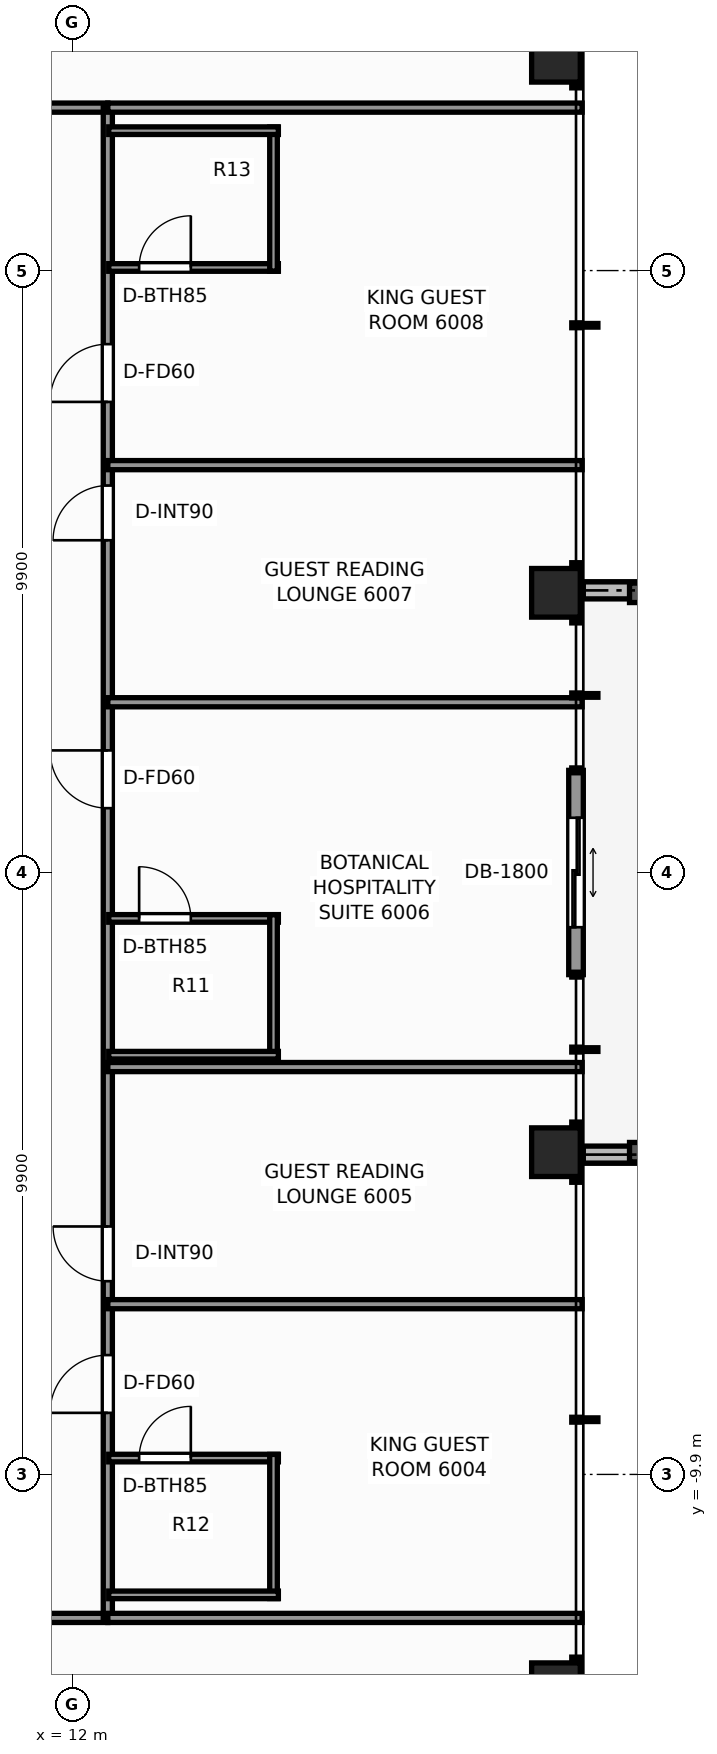
"""IFC4 building model, lengths in metres.
Left out: names, types, materials, properties, quantities, classifications, styles, units other than length and angle.
Written with IfcOpenShell. Run it as: python <this file> out.ifc"""

import sys

from ifc_helpers import new_model, si_unit, direction, frame, frame_2d, origin, origin_2d, place, context, subcontext, project, spatial, rectangle, extrude, element, fill, save


model = new_model("IFC4")
c1 = context("Model", 3, precision=1e-05, world=origin(), true_north=direction((0.0, 1.0)))
c2 = subcontext(c1, "Body", "Model", "MODEL_VIEW")
j1 = project(units=[si_unit("LENGTHUNIT", "METRE"), si_unit("PLANEANGLEUNIT", "RADIAN")], contexts=[c1])
p1 = place(None, origin())
s1 = spatial("IfcSite", under=j1, at=p1, CompositionType="ELEMENT")
p2 = place(p1, origin())
s2 = spatial("IfcBuilding", under=s1, at=p2, CompositionType="ELEMENT")
p3 = place(p2, frame((0.0, 0.0, 206.4)))
s3 = spatial("IfcBuildingStorey", under=s2, at=p3, CompositionType="ELEMENT", Elevation=206.4)
for number, where, z_axis, x_axis in (
    (1, (19.95, -13.4, 0.0), (0.0, 0.0, 1.0), (1.0, 0.0, 0.0)),
    (2, (19.95, -4.6, 0.0), (0.0, 0.0, 1.0), (1.0, 0.0, 0.0)),
    (3, (19.95, 4.6, 0.0), (0.0, 0.0, 1.0), (1.0, 0.0, 0.0)),
    (4, (19.95, 13.4, 0.0), (0.0, 0.0, 1.0), (1.0, 0.0, 0.0)),
):
    element("IfcColumn", number, at=place(p3, frame(where, z_axis=z_axis, x_axis=x_axis)), inside=s3, PredefinedType="COLUMN", context=c2, shape_type="SweptSolid", body=[
        extrude(rectangle(XDim=0.8, YDim=0.8, at=origin_2d()), origin(), (0.0, 0.0, 1.0), 3.3),
    ])
for number, where, z_axis, x_axis in (
    (5, (20.4, -4.64, -0.04), (0.0, 0.0, 1.0), (1.0, 0.0, 0.0)),
    (6, (23.7, 4.64, -0.04), (0.0, 0.0, 1.0), (-1.0, 0.0, 0.0)),
):
    element("IfcWall", number, at=place(p3, frame(where, z_axis=z_axis, x_axis=x_axis)), inside=s3, PredefinedType="PARAPET", context=c2, shape_type="SweptSolid", body=[
        extrude(rectangle(XDim=3.3, YDim=0.28, at=frame_2d((1.65, 0.0))), origin(), (0.0, 0.0, 1.0), 0.42),
    ])
p4 = place(p3, frame((20.28, 1.68, 0.0), z_axis=(0.0, 0.0, 1.0), x_axis=(0.0, -1.0, 0.0)))
e7 = element("IfcWall", 7, at=p4, inside=s3, PredefinedType="STANDARD", context=c2, shape_type="SweptSolid", body=[
    extrude(rectangle(XDim=3.36, YDim=0.24, at=frame_2d((1.68, 0.0))), origin(), (0.0, 0.0, 1.0), 3.08),
])
p5 = place(p4, frame((0.78, 0.0, 0.0)))
e8 = element("IfcOpeningElement", 8, at=p5, cuts=e7, PredefinedType="OPENING", context=c2, shape_type="SweptSolid", body=[
    extrude(rectangle(XDim=1.8, YDim=2.2, at=frame_2d((0.9, 1.1))), frame((0.0, 0.13, 0.0), z_axis=(0.0, -1.0, 0.0), x_axis=(1.0, 0.0, 0.0)), (0.0, 0.0, 1.0), 0.26),
])
p6 = place(p3, frame((-12.58, -12.26, 0.0), z_axis=(0.0, 0.0, 1.0), x_axis=(1.0, 0.0, 0.0)))
e9 = element("IfcWall", 9, at=p6, inside=s3, PredefinedType="PARTITIONING", context=c2, shape_type="SweptSolid", body=[
    extrude(rectangle(XDim=25.16, YDim=0.15, at=frame_2d((12.58, 0.0))), origin(), (0.0, 0.0, 1.0), 2.369),
])
p7 = place(p6, frame((3.657, 0.0, 0.0)))
e10 = element("IfcOpeningElement", 10, at=p7, cuts=e9, PredefinedType="OPENING", context=c2, shape_type="SweptSolid", body=[
    extrude(rectangle(XDim=0.9, YDim=2.06, at=frame_2d((0.45, 1.03))), frame((0.0, 0.085, 0.0), z_axis=(0.0, -1.0, 0.0), x_axis=(1.0, 0.0, 0.0)), (0.0, 0.0, 1.0), 0.17),
])
p8 = place(p6, frame((6.082, 0.0, 0.0)))
e11 = element("IfcOpeningElement", 11, at=p8, cuts=e9, PredefinedType="OPENING", context=c2, shape_type="SweptSolid", body=[
    extrude(rectangle(XDim=0.9, YDim=2.06, at=frame_2d((0.45, 1.03))), frame((0.0, 0.085, 0.0), z_axis=(0.0, -1.0, 0.0), x_axis=(1.0, 0.0, 0.0)), (0.0, 0.0, 1.0), 0.17),
])
p9 = place(p6, frame((8.836, 0.0, 0.0)))
e12 = element("IfcOpeningElement", 12, at=p9, cuts=e9, PredefinedType="OPENING", context=c2, shape_type="SweptSolid", body=[
    extrude(rectangle(XDim=0.95, YDim=2.06, at=frame_2d((0.475, 1.03))), frame((0.0, 0.085, 0.0), z_axis=(0.0, -1.0, 0.0), x_axis=(1.0, 0.0, 0.0)), (0.0, 0.0, 1.0), 0.17),
])
p10 = place(p6, frame((14.16, 0.0, 0.0)))
e13 = element("IfcOpeningElement", 13, at=p10, cuts=e9, PredefinedType="OPENING", context=c2, shape_type="SweptSolid", body=[
    extrude(rectangle(XDim=0.9, YDim=2.06, at=frame_2d((0.45, 1.03))), frame((0.0, 0.085, 0.0), z_axis=(0.0, -1.0, 0.0), x_axis=(1.0, 0.0, 0.0)), (0.0, 0.0, 1.0), 0.17),
])
p11 = place(p6, frame((20.341, 0.0, 0.0)))
e14 = element("IfcOpeningElement", 14, at=p11, cuts=e9, PredefinedType="OPENING", context=c2, shape_type="SweptSolid", body=[
    extrude(rectangle(XDim=0.9, YDim=2.06, at=frame_2d((0.45, 1.03))), frame((0.0, 0.085, 0.0), z_axis=(0.0, -1.0, 0.0), x_axis=(1.0, 0.0, 0.0)), (0.0, 0.0, 1.0), 0.17),
])
p12 = place(p3, frame((-12.58, 12.58, 0.0), z_axis=(0.0, 0.0, 1.0), x_axis=(1.0, 0.0, 0.0)))
e15 = element("IfcWall", 15, at=p12, inside=s3, PredefinedType="PARTITIONING", context=c2, shape_type="SweptSolid", body=[
    extrude(rectangle(XDim=25.16, YDim=0.15, at=frame_2d((12.58, 0.0))), origin(), (0.0, 0.0, 1.0), 2.369),
])
p13 = place(p12, frame((4.595, 0.0, 0.0)))
e16 = element("IfcOpeningElement", 16, at=p13, cuts=e15, PredefinedType="OPENING", context=c2, shape_type="SweptSolid", body=[
    extrude(rectangle(XDim=0.9, YDim=2.06, at=frame_2d((0.45, 1.03))), frame((0.0, 0.085, 0.0), z_axis=(0.0, -1.0, 0.0), x_axis=(1.0, 0.0, 0.0)), (0.0, 0.0, 1.0), 0.17),
])
p14 = place(p12, frame((19.665, 0.0, 0.0)))
e17 = element("IfcOpeningElement", 17, at=p14, cuts=e15, PredefinedType="OPENING", context=c2, shape_type="SweptSolid", body=[
    extrude(rectangle(XDim=0.9, YDim=2.06, at=frame_2d((0.45, 1.03))), frame((0.0, 0.085, 0.0), z_axis=(0.0, -1.0, 0.0), x_axis=(1.0, 0.0, 0.0)), (0.0, 0.0, 1.0), 0.17),
])
p15 = place(p3, frame((12.58, -12.26, 0.0), z_axis=(0.0, 0.0, 1.0), x_axis=(0.0, 1.0, 0.0)))
e18 = element("IfcWall", 18, at=p15, inside=s3, PredefinedType="PARTITIONING", context=c2, shape_type="SweptSolid", body=[
    extrude(rectangle(XDim=24.84, YDim=0.15, at=frame_2d((12.42, 0.0))), origin(), (0.0, 0.0, 1.0), 2.369),
])
p16 = place(p15, frame((3.373, 0.0, 0.0)))
e19 = element("IfcOpeningElement", 19, at=p16, cuts=e18, PredefinedType="OPENING", context=c2, shape_type="SweptSolid", body=[
    extrude(rectangle(XDim=0.95, YDim=2.06, at=frame_2d((0.475, 1.03))), frame((0.0, 0.085, 0.0), z_axis=(0.0, -1.0, 0.0), x_axis=(1.0, 0.0, 0.0)), (0.0, 0.0, 1.0), 0.17),
])
p17 = place(p15, frame((5.538, 0.0, 0.0)))
e20 = element("IfcOpeningElement", 20, at=p17, cuts=e18, PredefinedType="OPENING", context=c2, shape_type="SweptSolid", body=[
    extrude(rectangle(XDim=0.9, YDim=2.06, at=frame_2d((0.45, 1.03))), frame((0.0, 0.085, 0.0), z_axis=(0.0, -1.0, 0.0), x_axis=(1.0, 0.0, 0.0)), (0.0, 0.0, 1.0), 0.17),
])
p18 = place(p15, frame((13.318, 0.0, 0.0)))
e21 = element("IfcOpeningElement", 21, at=p18, cuts=e18, PredefinedType="OPENING", context=c2, shape_type="SweptSolid", body=[
    extrude(rectangle(XDim=0.95, YDim=2.06, at=frame_2d((0.475, 1.03))), frame((0.0, 0.085, 0.0), z_axis=(0.0, -1.0, 0.0), x_axis=(1.0, 0.0, 0.0)), (0.0, 0.0, 1.0), 0.17),
])
p19 = place(p15, frame((17.724, 0.0, 0.0)))
e22 = element("IfcOpeningElement", 22, at=p19, cuts=e18, PredefinedType="OPENING", context=c2, shape_type="SweptSolid", body=[
    extrude(rectangle(XDim=0.9, YDim=2.06, at=frame_2d((0.45, 1.03))), frame((0.0, 0.085, 0.0), z_axis=(0.0, -1.0, 0.0), x_axis=(1.0, 0.0, 0.0)), (0.0, 0.0, 1.0), 0.17),
])
p20 = place(p15, frame((20.0, 0.0, 0.0)))
e23 = element("IfcOpeningElement", 23, at=p20, cuts=e18, PredefinedType="OPENING", context=c2, shape_type="SweptSolid", body=[
    extrude(rectangle(XDim=0.95, YDim=2.06, at=frame_2d((0.475, 1.03))), frame((0.0, 0.085, 0.0), z_axis=(0.0, -1.0, 0.0), x_axis=(1.0, 0.0, 0.0)), (0.0, 0.0, 1.0), 0.17),
])
for number, where, z_axis, x_axis in (
    (24, (12.58, -12.26, 0.0), (0.0, 0.0, 1.0), (1.0, 0.0, 0.0)),
    (25, (12.58, 12.58, 0.0), (0.0, 0.0, 1.0), (1.0, 0.0, 0.0)),
):
    element("IfcWall", number, at=place(p3, frame(where, z_axis=z_axis, x_axis=x_axis)), inside=s3, PredefinedType="PARTITIONING", context=c2, shape_type="SweptSolid", body=[
        extrude(rectangle(XDim=7.8, YDim=0.15, at=frame_2d((3.9, 0.0))), origin(), (0.0, 0.0, 1.0), 2.369),
    ])
p21 = place(p3, frame((12.58, -7.1, 0.0), z_axis=(0.0, 0.0, 1.0), x_axis=(1.0, 0.0, 0.0)))
e26 = element("IfcWall", 26, at=p21, inside=s3, PredefinedType="PARTITIONING", context=c2, shape_type="SweptSolid", body=[
    extrude(rectangle(XDim=7.8, YDim=0.15, at=frame_2d((3.9, 0.0))), origin(), (0.0, 0.0, 1.0), 2.453),
])
p22 = place(p3, frame((12.595, -9.631, 0.0), z_axis=(0.0, 0.0, 1.0), x_axis=(1.0, 0.0, 0.0)))
e27 = element("IfcWall", 27, at=p22, inside=s3, PredefinedType="PARTITIONING", context=c2, shape_type="SweptSolid", body=[
    extrude(rectangle(XDim=2.79, YDim=0.125, at=frame_2d((1.395, 0.0))), origin(), (0.0, 0.0, 1.0), 3.08),
])
p23 = place(p22, frame((0.5, 0.0, 0.0)))
e28 = element("IfcOpeningElement", 28, at=p23, cuts=e27, PredefinedType="OPENING", context=c2, shape_type="SweptSolid", body=[
    extrude(rectangle(XDim=0.85, YDim=2.03, at=frame_2d((0.425, 1.015))), frame((0.0, 0.073, 0.0), z_axis=(0.0, -1.0, 0.0), x_axis=(1.0, 0.0, 0.0)), (0.0, 0.0, 1.0), 0.145),
])
p24 = place(p3, frame((15.305, -11.941, 0.0), z_axis=(0.0, 0.0, 1.0), x_axis=(0.0, 1.0, 0.0)))
e29 = element("IfcWall", 29, at=p24, inside=s3, PredefinedType="PARTITIONING", context=c2, shape_type="SweptSolid", body=[
    extrude(rectangle(XDim=2.37, YDim=0.125, at=frame_2d((1.185, 0.0))), origin(), (0.0, 0.0, 1.0), 2.369),
])
p25 = place(p3, frame((12.595, -11.881, 0.0), z_axis=(0.0, 0.0, 1.0), x_axis=(1.0, 0.0, 0.0)))
e30 = element("IfcWall", 30, at=p25, inside=s3, PredefinedType="PARTITIONING", context=c2, shape_type="SweptSolid", body=[
    extrude(rectangle(XDim=2.79, YDim=0.125, at=frame_2d((1.395, 0.0))), origin(), (0.0, 0.0, 1.0), 2.369),
])
for number, where, z_axis, x_axis in (
    (31, (12.58, -3.2, 0.0), (0.0, 0.0, 1.0), (1.0, 0.0, 0.0)),
    (32, (12.58, 2.8, 0.0), (0.0, 0.0, 1.0), (1.0, 0.0, 0.0)),
):
    element("IfcWall", number, at=place(p3, frame(where, z_axis=z_axis, x_axis=x_axis)), inside=s3, PredefinedType="PARTITIONING", context=c2, shape_type="SweptSolid", body=[
        extrude(rectangle(XDim=7.8, YDim=0.15, at=frame_2d((3.9, 0.0))), origin(), (0.0, 0.0, 1.0), 2.453),
    ])
p26 = place(p3, frame((12.595, -0.755, 0.0), z_axis=(0.0, 0.0, 1.0), x_axis=(1.0, 0.0, 0.0)))
e33 = element("IfcWall", 33, at=p26, inside=s3, PredefinedType="PARTITIONING", context=c2, shape_type="SweptSolid", body=[
    extrude(rectangle(XDim=2.79, YDim=0.125, at=frame_2d((1.395, 0.0))), origin(), (0.0, 0.0, 1.0), 3.08),
])
p27 = place(p26, frame((0.5, 0.0, 0.0)))
e34 = element("IfcOpeningElement", 34, at=p27, cuts=e33, PredefinedType="OPENING", context=c2, shape_type="SweptSolid", body=[
    extrude(rectangle(XDim=0.85, YDim=2.03, at=frame_2d((0.425, 1.015))), frame((0.0, 0.073, 0.0), z_axis=(0.0, -1.0, 0.0), x_axis=(1.0, 0.0, 0.0)), (0.0, 0.0, 1.0), 0.145),
])
p28 = place(p3, frame((15.305, -3.065, 0.0), z_axis=(0.0, 0.0, 1.0), x_axis=(0.0, 1.0, 0.0)))
e35 = element("IfcWall", 35, at=p28, inside=s3, PredefinedType="PARTITIONING", context=c2, shape_type="SweptSolid", body=[
    extrude(rectangle(XDim=2.37, YDim=0.125, at=frame_2d((1.185, 0.0))), origin(), (0.0, 0.0, 1.0), 3.08),
])
p29 = place(p3, frame((12.595, -3.005, 0.0), z_axis=(0.0, 0.0, 1.0), x_axis=(1.0, 0.0, 0.0)))
e36 = element("IfcWall", 36, at=p29, inside=s3, PredefinedType="PARTITIONING", context=c2, shape_type="SweptSolid", body=[
    extrude(rectangle(XDim=2.79, YDim=0.125, at=frame_2d((1.395, 0.0))), origin(), (0.0, 0.0, 1.0), 3.08),
])
p30 = place(p3, frame((12.58, 6.7, 0.0), z_axis=(0.0, 0.0, 1.0), x_axis=(1.0, 0.0, 0.0)))
e37 = element("IfcWall", 37, at=p30, inside=s3, PredefinedType="PARTITIONING", context=c2, shape_type="SweptSolid", body=[
    extrude(rectangle(XDim=7.8, YDim=0.15, at=frame_2d((3.9, 0.0))), origin(), (0.0, 0.0, 1.0), 2.453),
])
p31 = place(p3, frame((12.595, 9.951, 0.0), z_axis=(0.0, 0.0, 1.0), x_axis=(1.0, 0.0, 0.0)))
e38 = element("IfcWall", 38, at=p31, inside=s3, PredefinedType="PARTITIONING", context=c2, shape_type="SweptSolid", body=[
    extrude(rectangle(XDim=2.79, YDim=0.125, at=frame_2d((1.395, 0.0))), origin(), (0.0, 0.0, 1.0), 3.08),
])
p32 = place(p31, frame((0.5, 0.0, 0.0)))
e39 = element("IfcOpeningElement", 39, at=p32, cuts=e38, PredefinedType="OPENING", context=c2, shape_type="SweptSolid", body=[
    extrude(rectangle(XDim=0.85, YDim=2.03, at=frame_2d((0.425, 1.015))), frame((0.0, 0.073, 0.0), z_axis=(0.0, -1.0, 0.0), x_axis=(1.0, 0.0, 0.0)), (0.0, 0.0, 1.0), 0.145),
])
p33 = place(p3, frame((15.305, 9.891, 0.0), z_axis=(0.0, 0.0, 1.0), x_axis=(0.0, 1.0, 0.0)))
e40 = element("IfcWall", 40, at=p33, inside=s3, PredefinedType="PARTITIONING", context=c2, shape_type="SweptSolid", body=[
    extrude(rectangle(XDim=2.37, YDim=0.125, at=frame_2d((1.185, 0.0))), origin(), (0.0, 0.0, 1.0), 2.369),
])
p34 = place(p3, frame((12.595, 12.201, 0.0), z_axis=(0.0, 0.0, 1.0), x_axis=(1.0, 0.0, 0.0)))
e41 = element("IfcWall", 41, at=p34, inside=s3, PredefinedType="PARTITIONING", context=c2, shape_type="SweptSolid", body=[
    extrude(rectangle(XDim=2.79, YDim=0.125, at=frame_2d((1.395, 0.0))), origin(), (0.0, 0.0, 1.0), 3.08),
])
p35 = place(p5, origin())
e42 = element("IfcDoor", 42, at=p35, inside=s3, OperationType="DOUBLE_DOOR_SLIDING", PredefinedType="DOOR", context=c2, shape_type="SweptSolid", body=[
    extrude(rectangle(XDim=1.8, YDim=2.2, at=frame_2d((0.9, 1.1))), frame((0.0, 0.025, 0.0), z_axis=(0.0, -1.0, 0.0), x_axis=(1.0, 0.0, 0.0)), (0.0, 0.0, 1.0), 0.05),
])
fill(e8, e42)
p36 = place(p23, origin())
e43 = element("IfcDoor", 43, at=p36, inside=s3, OperationType="SINGLE_SWING_RIGHT", PredefinedType="DOOR", context=c2, shape_type="SweptSolid", body=[
    extrude(rectangle(XDim=0.85, YDim=2.03, at=frame_2d((0.425, 1.015))), frame((0.0, 0.025, 0.0), z_axis=(0.0, -1.0, 0.0), x_axis=(1.0, 0.0, 0.0)), (0.0, 0.0, 1.0), 0.05),
])
fill(e28, e43)
p37 = place(p16, origin())
e44 = element("IfcDoor", 44, at=p37, inside=s3, OperationType="SINGLE_SWING_LEFT", PredefinedType="DOOR", context=c2, shape_type="SweptSolid", body=[
    extrude(rectangle(XDim=0.95, YDim=2.06, at=frame_2d((0.475, 1.03))), frame((0.0, 0.025, 0.0), z_axis=(0.0, -1.0, 0.0), x_axis=(1.0, 0.0, 0.0)), (0.0, 0.0, 1.0), 0.05),
])
fill(e19, e44)
p38 = place(p17, origin())
e45 = element("IfcDoor", 45, at=p38, inside=s3, OperationType="SINGLE_SWING_RIGHT", PredefinedType="DOOR", context=c2, shape_type="SweptSolid", body=[
    extrude(rectangle(XDim=0.9, YDim=2.06, at=frame_2d((0.45, 1.03))), frame((0.0, 0.025, 0.0), z_axis=(0.0, -1.0, 0.0), x_axis=(1.0, 0.0, 0.0)), (0.0, 0.0, 1.0), 0.05),
])
fill(e20, e45)
p39 = place(p27, origin())
e46 = element("IfcDoor", 46, at=p39, inside=s3, OperationType="SINGLE_SWING_LEFT", PredefinedType="DOOR", context=c2, shape_type="SweptSolid", body=[
    extrude(rectangle(XDim=0.85, YDim=2.03, at=frame_2d((0.425, 1.015))), frame((0.0, 0.025, 0.0), z_axis=(0.0, -1.0, 0.0), x_axis=(1.0, 0.0, 0.0)), (0.0, 0.0, 1.0), 0.05),
])
fill(e34, e46)
p40 = place(p18, origin())
e47 = element("IfcDoor", 47, at=p40, inside=s3, OperationType="SINGLE_SWING_RIGHT", PredefinedType="DOOR", context=c2, shape_type="SweptSolid", body=[
    extrude(rectangle(XDim=0.95, YDim=2.06, at=frame_2d((0.475, 1.03))), frame((0.0, 0.025, 0.0), z_axis=(0.0, -1.0, 0.0), x_axis=(1.0, 0.0, 0.0)), (0.0, 0.0, 1.0), 0.05),
])
fill(e21, e47)
p41 = place(p19, origin())
e48 = element("IfcDoor", 48, at=p41, inside=s3, OperationType="SINGLE_SWING_LEFT", PredefinedType="DOOR", context=c2, shape_type="SweptSolid", body=[
    extrude(rectangle(XDim=0.9, YDim=2.06, at=frame_2d((0.45, 1.03))), frame((0.0, 0.025, 0.0), z_axis=(0.0, -1.0, 0.0), x_axis=(1.0, 0.0, 0.0)), (0.0, 0.0, 1.0), 0.05),
])
fill(e22, e48)
p42 = place(p32, origin())
e49 = element("IfcDoor", 49, at=p42, inside=s3, OperationType="SINGLE_SWING_RIGHT", PredefinedType="DOOR", context=c2, shape_type="SweptSolid", body=[
    extrude(rectangle(XDim=0.85, YDim=2.03, at=frame_2d((0.425, 1.015))), frame((0.0, 0.025, 0.0), z_axis=(0.0, -1.0, 0.0), x_axis=(1.0, 0.0, 0.0)), (0.0, 0.0, 1.0), 0.05),
])
fill(e39, e49)
p43 = place(p20, origin())
e50 = element("IfcDoor", 50, at=p43, inside=s3, OperationType="SINGLE_SWING_LEFT", PredefinedType="DOOR", context=c2, shape_type="SweptSolid", body=[
    extrude(rectangle(XDim=0.95, YDim=2.06, at=frame_2d((0.475, 1.03))), frame((0.0, 0.025, 0.0), z_axis=(0.0, -1.0, 0.0), x_axis=(1.0, 0.0, 0.0)), (0.0, 0.0, 1.0), 0.05),
])
fill(e23, e50)
save(model, sys.argv[1])
